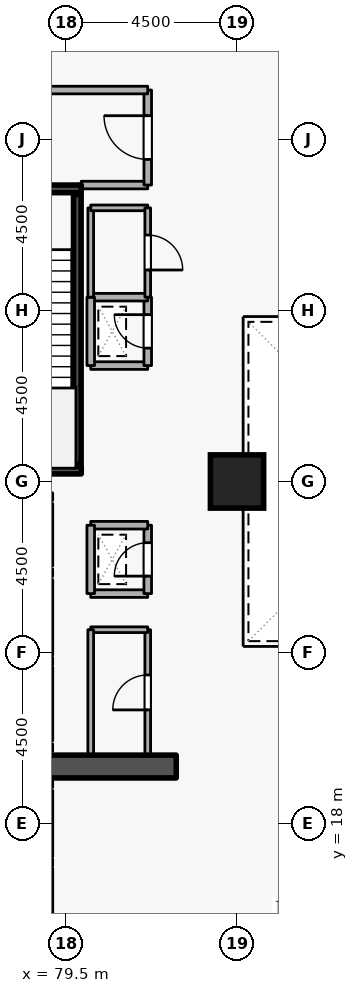
"""IFC4 building model, lengths in metres.
Left out: names, types, materials, properties, quantities, classifications, styles, units other than length and angle.
Written with IfcOpenShell. Run it as: python <this file> out.ifc"""

import sys

from ifc_helpers import new_model, si_unit, direction, frame, frame_2d, origin, origin_2d, place, context, subcontext, project, spatial, rectangle, extrude, element, fill, save


model = new_model("IFC4")
c1 = context("Model", 3, precision=1e-05, world=origin(), true_north=direction((0.0, 1.0)))
c2 = subcontext(c1, "Body", "Model", "MODEL_VIEW")
j1 = project(units=[si_unit("LENGTHUNIT", "METRE"), si_unit("PLANEANGLEUNIT", "RADIAN")], contexts=[c1])
p1 = place(None, origin())
s1 = spatial("IfcSite", under=j1, at=p1, CompositionType="ELEMENT")
p2 = place(p1, origin())
s2 = spatial("IfcBuilding", under=s1, at=p2, CompositionType="ELEMENT")
p3 = place(p2, frame((0.0, 0.0, 9.6)))
s3 = spatial("IfcBuildingStorey", under=s2, at=p3, CompositionType="ELEMENT", Elevation=9.6)
p4 = place(p3, frame((76.7, 19.5, 0.0), z_axis=(0.0, 0.0, 1.0), x_axis=(1.0, 0.0, 0.0)))
e1 = element("IfcWall", 1, at=p4, inside=s3, PredefinedType="SHEAR", context=c2, shape_type="SweptSolid", body=[
    extrude(rectangle(XDim=5.7, YDim=0.6, at=frame_2d((2.85, 0.0))), origin(), (0.0, 0.0, 1.0), 4.5),
])
p5 = place(p3, frame((84.0, 27.0, 0.0), z_axis=(0.0, 0.0, 1.0), x_axis=(1.0, 0.0, 0.0)))
e2 = element("IfcColumn", 2, at=p5, inside=s3, PredefinedType="COLUMN", context=c2, shape_type="SweptSolid", body=[
    extrude(rectangle(XDim=1.4, YDim=1.4, at=origin_2d()), origin(), (0.0, 0.0, 1.0), 4.5),
])
p6 = place(p3, frame((79.05, 24.78, 0.0), z_axis=(0.0, 0.0, 1.0), x_axis=(0.0, 1.0, 0.0)))
e3 = element("IfcWall", 3, at=p6, inside=s3, PredefinedType="STANDARD", context=c2, shape_type="SweptSolid", body=[
    extrude(rectangle(XDim=1.64, YDim=0.2, at=frame_2d((0.82, 0.0))), origin(), (0.0, 0.0, 1.0), 4.16),
])
p7 = place(p6, frame((0.31, 0.0, 0.0)))
e4 = element("IfcOpeningElement", 4, at=p7, cuts=e3, PredefinedType="OPENING", context=c2, shape_type="SweptSolid", body=[
    extrude(rectangle(XDim=1.02, YDim=2.06, at=frame_2d((0.51, 1.03))), frame((0.0, 0.11, 0.0), z_axis=(0.0, -1.0, 0.0), x_axis=(1.0, 0.0, 0.0)), (0.0, 0.0, 1.0), 0.22),
])
p8 = place(p3, frame((79.05, 22.43, 0.0), z_axis=(0.0, 0.0, 1.0), x_axis=(0.0, 1.0, 0.0)))
e5 = element("IfcWall", 5, at=p8, inside=s3, PredefinedType="STANDARD", context=c2, shape_type="SweptSolid", body=[
    extrude(rectangle(XDim=1.99, YDim=0.2, at=frame_2d((0.995, 0.0))), origin(), (0.0, 0.0, 1.0), 4.16),
])
p9 = place(p3, frame((79.05, 20.18, 0.0), z_axis=(0.0, 0.0, 1.0), x_axis=(0.0, 1.0, 0.0)))
e6 = element("IfcWall", 6, at=p9, inside=s3, PredefinedType="STANDARD", context=c2, shape_type="SweptSolid", body=[
    extrude(rectangle(XDim=1.94, YDim=0.2, at=frame_2d((0.97, 0.0))), origin(), (0.0, 0.0, 1.0), 4.16),
])
p10 = place(p3, frame((79.05, 17.13, 0.0), z_axis=(0.0, 0.0, 1.0), x_axis=(0.0, 1.0, 0.0)))
e7 = element("IfcWall", 7, at=p10, inside=s3, PredefinedType="STANDARD", context=c2, shape_type="SweptSolid", body=[
    extrude(rectangle(XDim=1.74, YDim=0.2, at=frame_2d((0.87, 0.0))), origin(), (0.0, 0.0, 1.0), 4.16),
])
p11 = place(p3, frame((79.05, 15.03, 0.0), z_axis=(0.0, 0.0, 1.0), x_axis=(0.0, 1.0, 0.0)))
e8 = element("IfcWall", 8, at=p11, inside=s3, PredefinedType="STANDARD", context=c2, shape_type="SweptSolid", body=[
    extrude(rectangle(XDim=1.79, YDim=0.2, at=frame_2d((0.895, 0.0))), origin(), (0.0, 0.0, 1.0), 4.16),
])
p12 = place(p3, frame((76.55, 34.7, 0.0), z_axis=(0.0, 0.0, 1.0), x_axis=(1.0, 0.0, 0.0)))
e9 = element("IfcWall", 9, at=p12, inside=s3, PredefinedType="SHEAR", context=c2, shape_type="SweptSolid", body=[
    extrude(rectangle(XDim=3.35, YDim=0.2, at=frame_2d((1.675, 0.0))), origin(), (0.0, 0.0, 1.0), 4.5),
])
p13 = place(p12, frame((1.125, 0.0, 0.0)))
e10 = element("IfcOpeningElement", 10, at=p13, cuts=e9, PredefinedType="OPENING", context=c2, shape_type="SweptSolid", body=[
    extrude(rectangle(XDim=1.1, YDim=2.1, at=frame_2d((0.55, 1.05))), frame((0.0, 0.11, 0.0), z_axis=(0.0, -1.0, 0.0), x_axis=(1.0, 0.0, 0.0)), (0.0, 0.0, 1.0), 0.22),
])
p14 = place(p3, frame((79.9, 27.3, 0.0), z_axis=(0.0, 0.0, 1.0), x_axis=(-1.0, 0.0, 0.0)))
e11 = element("IfcWall", 11, at=p14, inside=s3, PredefinedType="SHEAR", context=c2, shape_type="SweptSolid", body=[
    extrude(rectangle(XDim=3.35, YDim=0.2, at=frame_2d((1.675, 0.0))), origin(), (0.0, 0.0, 1.0), 4.5),
])
p15 = place(p3, frame((79.797, 27.45, 0.0), z_axis=(0.0, 0.0, 1.0), x_axis=(0.0, 1.0, 0.0)))
e12 = element("IfcWall", 12, at=p15, inside=s3, PredefinedType="SHEAR", context=c2, shape_type="SweptSolid", body=[
    extrude(rectangle(XDim=7.1, YDim=0.2, at=frame_2d((3.55, 0.0))), origin(), (0.0, 0.0, 1.0), 4.5),
])
p16 = place(p3, frame((79.9, 34.8, 0.0), z_axis=(0.0, 0.0, 1.0), x_axis=(1.0, 0.0, 0.0)))
e13 = element("IfcWall", 13, at=p16, inside=s3, PredefinedType="STANDARD", context=c2, shape_type="SweptSolid", body=[
    extrude(rectangle(XDim=1.75, YDim=0.2, at=frame_2d((0.875, 0.0))), origin(), (0.0, 0.0, 1.0), 3.365),
])
p17 = place(p3, frame((81.65, 34.8, 0.0), z_axis=(0.0, 0.0, 1.0), x_axis=(0.0, 1.0, 0.0)))
e14 = element("IfcWall", 14, at=p17, inside=s3, PredefinedType="STANDARD", context=c2, shape_type="SweptSolid", body=[
    extrude(rectangle(XDim=2.5, YDim=0.2, at=frame_2d((1.25, 0.0))), origin(), (0.0, 0.0, 1.0), 4.16),
])
p18 = place(p17, frame((0.675, 0.0, 0.0)))
e15 = element("IfcOpeningElement", 15, at=p18, cuts=e14, PredefinedType="OPENING", context=c2, shape_type="SweptSolid", body=[
    extrude(rectangle(XDim=1.15, YDim=2.1, at=frame_2d((0.575, 1.05))), frame((0.0, 0.11, 0.0), z_axis=(0.0, -1.0, 0.0), x_axis=(1.0, 0.0, 0.0)), (0.0, 0.0, 1.0), 0.22),
])
p19 = place(p3, frame((81.65, 37.3, 0.0), z_axis=(0.0, 0.0, 1.0), x_axis=(-1.0, 0.0, 0.0)))
e16 = element("IfcWall", 16, at=p19, inside=s3, PredefinedType="STANDARD", context=c2, shape_type="SweptSolid", body=[
    extrude(rectangle(XDim=5.15, YDim=0.2, at=frame_2d((2.575, 0.0))), origin(), (0.0, 0.0, 1.0), 4.16),
])
p20 = place(p3, frame((80.15, 24.05, 0.0), z_axis=(0.0, 0.0, 1.0), x_axis=(1.0, 0.0, 0.0)))
e17 = element("IfcWall", 17, at=p20, inside=s3, PredefinedType="STANDARD", context=c2, shape_type="SweptSolid", body=[
    extrude(rectangle(XDim=1.5, YDim=0.2, at=frame_2d((0.75, 0.0))), origin(), (0.0, 0.0, 1.0), 4.16),
])
p21 = place(p3, frame((81.65, 24.05, 0.0), z_axis=(0.0, 0.0, 1.0), x_axis=(0.0, 1.0, 0.0)))
e18 = element("IfcWall", 18, at=p21, inside=s3, PredefinedType="STANDARD", context=c2, shape_type="SweptSolid", body=[
    extrude(rectangle(XDim=1.8, YDim=0.2, at=frame_2d((0.9, 0.0))), origin(), (0.0, 0.0, 1.0), 4.16),
])
p22 = place(p21, frame((0.46, 0.0, 0.0)))
e19 = element("IfcOpeningElement", 19, at=p22, cuts=e18, PredefinedType="OPENING", context=c2, shape_type="SweptSolid", body=[
    extrude(rectangle(XDim=0.88, YDim=2.04, at=frame_2d((0.44, 1.02))), frame((0.0, 0.11, 0.0), z_axis=(0.0, -1.0, 0.0), x_axis=(1.0, 0.0, 0.0)), (0.0, 0.0, 1.0), 0.22),
])
p23 = place(p3, frame((81.65, 25.85, 0.0), z_axis=(0.0, 0.0, 1.0), x_axis=(-1.0, 0.0, 0.0)))
e20 = element("IfcWall", 20, at=p23, inside=s3, PredefinedType="STANDARD", context=c2, shape_type="SweptSolid", body=[
    extrude(rectangle(XDim=1.5, YDim=0.2, at=frame_2d((0.75, 0.0))), origin(), (0.0, 0.0, 1.0), 4.16),
])
p24 = place(p3, frame((80.15, 25.85, 0.0), z_axis=(0.0, 0.0, 1.0), x_axis=(0.0, -1.0, 0.0)))
e21 = element("IfcWall", 21, at=p24, inside=s3, PredefinedType="STANDARD", context=c2, shape_type="SweptSolid", body=[
    extrude(rectangle(XDim=1.8, YDim=0.2, at=frame_2d((0.9, 0.0))), origin(), (0.0, 0.0, 1.0), 4.16),
])
p25 = place(p3, frame((80.15, 30.05, 0.0), z_axis=(0.0, 0.0, 1.0), x_axis=(1.0, 0.0, 0.0)))
e22 = element("IfcWall", 22, at=p25, inside=s3, PredefinedType="STANDARD", context=c2, shape_type="SweptSolid", body=[
    extrude(rectangle(XDim=1.5, YDim=0.2, at=frame_2d((0.75, 0.0))), origin(), (0.0, 0.0, 1.0), 4.16),
])
p26 = place(p3, frame((81.65, 30.05, 0.0), z_axis=(0.0, 0.0, 1.0), x_axis=(0.0, 1.0, 0.0)))
e23 = element("IfcWall", 23, at=p26, inside=s3, PredefinedType="STANDARD", context=c2, shape_type="SweptSolid", body=[
    extrude(rectangle(XDim=1.8, YDim=0.2, at=frame_2d((0.9, 0.0))), origin(), (0.0, 0.0, 1.0), 4.16),
])
p27 = place(p26, frame((0.46, 0.0, 0.0)))
e24 = element("IfcOpeningElement", 24, at=p27, cuts=e23, PredefinedType="OPENING", context=c2, shape_type="SweptSolid", body=[
    extrude(rectangle(XDim=0.88, YDim=2.04, at=frame_2d((0.44, 1.02))), frame((0.0, 0.11, 0.0), z_axis=(0.0, -1.0, 0.0), x_axis=(1.0, 0.0, 0.0)), (0.0, 0.0, 1.0), 0.22),
])
p28 = place(p3, frame((81.65, 31.85, 0.0), z_axis=(0.0, 0.0, 1.0), x_axis=(-1.0, 0.0, 0.0)))
e25 = element("IfcWall", 25, at=p28, inside=s3, PredefinedType="STANDARD", context=c2, shape_type="SweptSolid", body=[
    extrude(rectangle(XDim=1.5, YDim=0.2, at=frame_2d((0.75, 0.0))), origin(), (0.0, 0.0, 1.0), 4.16),
])
p29 = place(p3, frame((80.15, 31.85, 0.0), z_axis=(0.0, 0.0, 1.0), x_axis=(0.0, -1.0, 0.0)))
e26 = element("IfcWall", 26, at=p29, inside=s3, PredefinedType="STANDARD", context=c2, shape_type="SweptSolid", body=[
    extrude(rectangle(XDim=1.8, YDim=0.2, at=frame_2d((0.9, 0.0))), origin(), (0.0, 0.0, 1.0), 4.16),
])
p30 = place(p3, frame((81.65, 19.8, 0.0), z_axis=(0.0, 0.0, 1.0), x_axis=(0.0, 1.0, 0.0)))
e27 = element("IfcWall", 27, at=p30, inside=s3, PredefinedType="PARTITIONING", context=c2, shape_type="SweptSolid", body=[
    extrude(rectangle(XDim=3.3, YDim=0.15, at=frame_2d((1.65, 0.0))), origin(), (0.0, 0.0, 1.0), 4.16),
])
p31 = place(p30, frame((1.19, 0.0, 0.0)))
e28 = element("IfcOpeningElement", 28, at=p31, cuts=e27, PredefinedType="OPENING", context=c2, shape_type="SweptSolid", body=[
    extrude(rectangle(XDim=0.92, YDim=2.08, at=frame_2d((0.46, 1.04))), frame((0.0, 0.085, 0.0), z_axis=(0.0, -1.0, 0.0), x_axis=(1.0, 0.0, 0.0)), (0.0, 0.0, 1.0), 0.17),
])
p32 = place(p3, frame((81.65, 23.1, 0.0), z_axis=(0.0, 0.0, 1.0), x_axis=(-1.0, 0.0, 0.0)))
e29 = element("IfcWall", 29, at=p32, inside=s3, PredefinedType="PARTITIONING", context=c2, shape_type="SweptSolid", body=[
    extrude(rectangle(XDim=1.5, YDim=0.15, at=frame_2d((0.75, 0.0))), origin(), (0.0, 0.0, 1.0), 4.16),
])
p33 = place(p3, frame((80.15, 23.1, 0.0), z_axis=(0.0, 0.0, 1.0), x_axis=(0.0, -1.0, 0.0)))
e30 = element("IfcWall", 30, at=p33, inside=s3, PredefinedType="PARTITIONING", context=c2, shape_type="SweptSolid", body=[
    extrude(rectangle(XDim=3.3, YDim=0.15, at=frame_2d((1.65, 0.0))), origin(), (0.0, 0.0, 1.0), 4.16),
])
p34 = place(p3, frame((80.15, 31.85, 0.0), z_axis=(0.0, 0.0, 1.0), x_axis=(0.0, 1.0, 0.0)))
e31 = element("IfcWall", 31, at=p34, inside=s3, PredefinedType="PARTITIONING", context=c2, shape_type="SweptSolid", body=[
    extrude(rectangle(XDim=2.35, YDim=0.15, at=frame_2d((1.175, 0.0))), origin(), (0.0, 0.0, 1.0), 4.16),
])
p35 = place(p3, frame((80.15, 34.2, 0.0), z_axis=(0.0, 0.0, 1.0), x_axis=(1.0, 0.0, 0.0)))
e32 = element("IfcWall", 32, at=p35, inside=s3, PredefinedType="PARTITIONING", context=c2, shape_type="SweptSolid", body=[
    extrude(rectangle(XDim=1.5, YDim=0.15, at=frame_2d((0.75, 0.0))), origin(), (0.0, 0.0, 1.0), 3.365),
])
p36 = place(p3, frame((81.65, 34.2, 0.0), z_axis=(0.0, 0.0, 1.0), x_axis=(0.0, -1.0, 0.0)))
e33 = element("IfcWall", 33, at=p36, inside=s3, PredefinedType="PARTITIONING", context=c2, shape_type="SweptSolid", body=[
    extrude(rectangle(XDim=2.35, YDim=0.15, at=frame_2d((1.175, 0.0))), origin(), (0.0, 0.0, 1.0), 4.16),
])
p37 = place(p36, frame((0.715, 0.0, 0.0)))
e34 = element("IfcOpeningElement", 34, at=p37, cuts=e33, PredefinedType="OPENING", context=c2, shape_type="SweptSolid", body=[
    extrude(rectangle(XDim=0.92, YDim=2.08, at=frame_2d((0.46, 1.04))), frame((0.0, 0.085, 0.0), z_axis=(0.0, -1.0, 0.0), x_axis=(1.0, 0.0, 0.0)), (0.0, 0.0, 1.0), 0.17),
])
p38 = place(p18, origin())
e35 = element("IfcDoor", 35, at=p38, inside=s3, OperationType="SINGLE_SWING_RIGHT", PredefinedType="DOOR", context=c2, shape_type="SweptSolid", body=[
    extrude(rectangle(XDim=1.15, YDim=2.1, at=frame_2d((0.575, 1.05))), frame((0.0, 0.025, 0.0), z_axis=(0.0, -1.0, 0.0), x_axis=(1.0, 0.0, 0.0)), (0.0, 0.0, 1.0), 0.05),
])
fill(e15, e35)
p39 = place(p22, origin())
e36 = element("IfcDoor", 36, at=p39, inside=s3, OperationType="SINGLE_SWING_LEFT", PredefinedType="DOOR", context=c2, shape_type="SweptSolid", body=[
    extrude(rectangle(XDim=0.88, YDim=2.04, at=frame_2d((0.44, 1.02))), frame((0.0, 0.025, 0.0), z_axis=(0.0, -1.0, 0.0), x_axis=(1.0, 0.0, 0.0)), (0.0, 0.0, 1.0), 0.05),
])
fill(e19, e36)
p40 = place(p27, origin())
e37 = element("IfcDoor", 37, at=p40, inside=s3, OperationType="SINGLE_SWING_RIGHT", PredefinedType="DOOR", context=c2, shape_type="SweptSolid", body=[
    extrude(rectangle(XDim=0.88, YDim=2.04, at=frame_2d((0.44, 1.02))), frame((0.0, 0.025, 0.0), z_axis=(0.0, -1.0, 0.0), x_axis=(1.0, 0.0, 0.0)), (0.0, 0.0, 1.0), 0.05),
])
fill(e24, e37)
p41 = place(p31, origin())
e38 = element("IfcDoor", 38, at=p41, inside=s3, OperationType="SINGLE_SWING_LEFT", PredefinedType="DOOR", context=c2, shape_type="SweptSolid", body=[
    extrude(rectangle(XDim=0.92, YDim=2.08, at=frame_2d((0.46, 1.04))), frame((0.0, 0.025, 0.0), z_axis=(0.0, -1.0, 0.0), x_axis=(1.0, 0.0, 0.0)), (0.0, 0.0, 1.0), 0.05),
])
fill(e28, e38)
p42 = place(p37, origin())
e39 = element("IfcDoor", 39, at=p42, inside=s3, OperationType="SINGLE_SWING_RIGHT", PredefinedType="DOOR", context=c2, shape_type="SweptSolid", body=[
    extrude(rectangle(XDim=0.92, YDim=2.08, at=frame_2d((0.46, 1.04))), frame((0.0, 0.025, 0.0), z_axis=(0.0, -1.0, 0.0), x_axis=(1.0, 0.0, 0.0)), (0.0, 0.0, 1.0), 0.05),
])
fill(e34, e39)
save(model, sys.argv[1])
